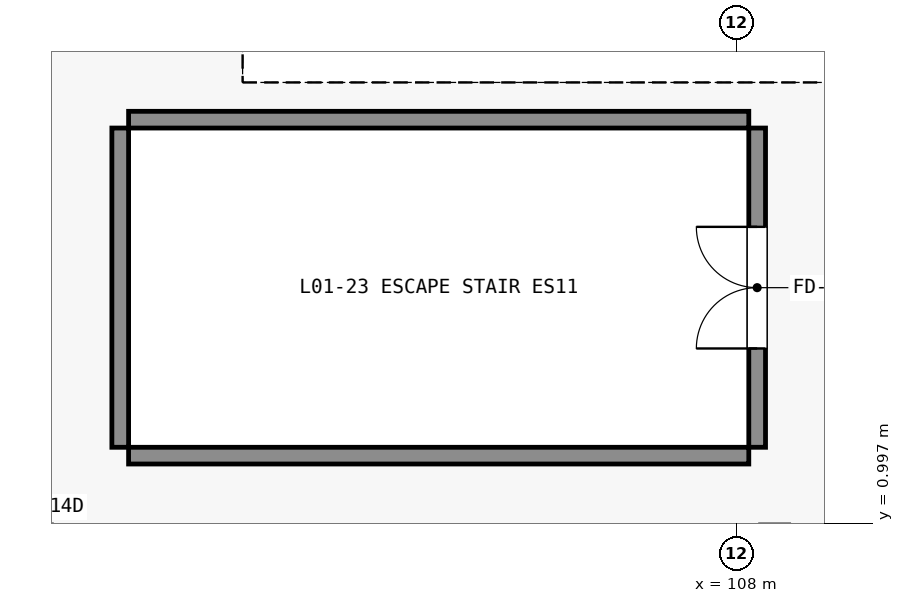
"""IFC4 building model, lengths in metres.
Left out: names, types, materials, properties, quantities, classifications, styles, units other than length and angle.
Written with IfcOpenShell. Run it as: python <this file> out.ifc"""

import sys

from ifc_helpers import new_model, si_unit, direction, frame, frame_2d, origin, place, context, subcontext, project, spatial, rectangle, extrude, element, fill, save


model = new_model("IFC4")
c1 = context("Model", 3, precision=1e-05, world=origin(), true_north=direction((0.0, 1.0)))
c2 = subcontext(c1, "Body", "Model", "MODEL_VIEW")
j1 = project(units=[si_unit("LENGTHUNIT", "METRE"), si_unit("PLANEANGLEUNIT", "RADIAN")], contexts=[c1])
p1 = place(None, origin())
s1 = spatial("IfcSite", under=j1, at=p1, CompositionType="ELEMENT")
p2 = place(p1, origin())
s2 = spatial("IfcBuilding", under=s1, at=p2, CompositionType="ELEMENT")
p3 = place(p2, frame((0.0, 0.0, 6.0)))
s3 = spatial("IfcBuildingStorey", under=s2, at=p3, CompositionType="ELEMENT", Elevation=6.0)
for number, where, z_axis, x_axis in (
    (1, (100.0, 1.89, 0.0), (0.0, 0.0, 1.0), (1.0, 0.0, 0.0)),
    (2, (100.0, 6.31, 0.0), (0.0, 0.0, 1.0), (1.0, 0.0, 0.0)),
):
    element("IfcWall", number, at=place(p3, frame(where, z_axis=z_axis, x_axis=x_axis)), inside=s3, PredefinedType="SHEAR", context=c2, shape_type="SweptSolid", body=[
        extrude(rectangle(XDim=8.16, YDim=0.22, at=frame_2d((4.08, 0.0))), origin(), (0.0, 0.0, 1.0), 5.1),
    ])
p4 = place(p3, frame((99.89, 2.0, 0.0), z_axis=(0.0, 0.0, 1.0), x_axis=(0.0, 1.0, 0.0)))
e3 = element("IfcWall", 3, at=p4, inside=s3, PredefinedType="SHEAR", context=c2, shape_type="SweptSolid", body=[
    extrude(rectangle(XDim=4.2, YDim=0.22, at=frame_2d((2.1, 0.0))), origin(), (0.0, 0.0, 1.0), 5.1),
])
p5 = place(p3, frame((108.27, 2.0, 0.0), z_axis=(0.0, 0.0, 1.0), x_axis=(0.0, 1.0, 0.0)))
e4 = element("IfcWall", 4, at=p5, inside=s3, PredefinedType="SHEAR", context=c2, shape_type="SweptSolid", body=[
    extrude(rectangle(XDim=4.2, YDim=0.22, at=frame_2d((2.1, 0.0))), origin(), (0.0, 0.0, 1.0), 5.1),
])
p6 = place(p5, frame((1.3, 0.0, 0.0)))
e5 = element("IfcOpeningElement", 5, at=p6, cuts=e4, PredefinedType="OPENING", context=c2, shape_type="SweptSolid", body=[
    extrude(rectangle(XDim=1.6, YDim=2.2, at=frame_2d((0.8, 1.1))), frame((0.0, 0.12, 0.0), z_axis=(0.0, -1.0, 0.0), x_axis=(1.0, 0.0, 0.0)), (0.0, 0.0, 1.0), 0.24),
])
p7 = place(p6, origin())
e6 = element("IfcDoor", 6, at=p7, inside=s3, OperationType="DOUBLE_DOOR_SINGLE_SWING", PredefinedType="DOOR", context=c2, shape_type="SweptSolid", body=[
    extrude(rectangle(XDim=1.6, YDim=2.2, at=frame_2d((0.8, 1.1))), frame((0.0, 0.025, 0.0), z_axis=(0.0, -1.0, 0.0), x_axis=(1.0, 0.0, 0.0)), (0.0, 0.0, 1.0), 0.05),
])
fill(e5, e6)
save(model, sys.argv[1])
